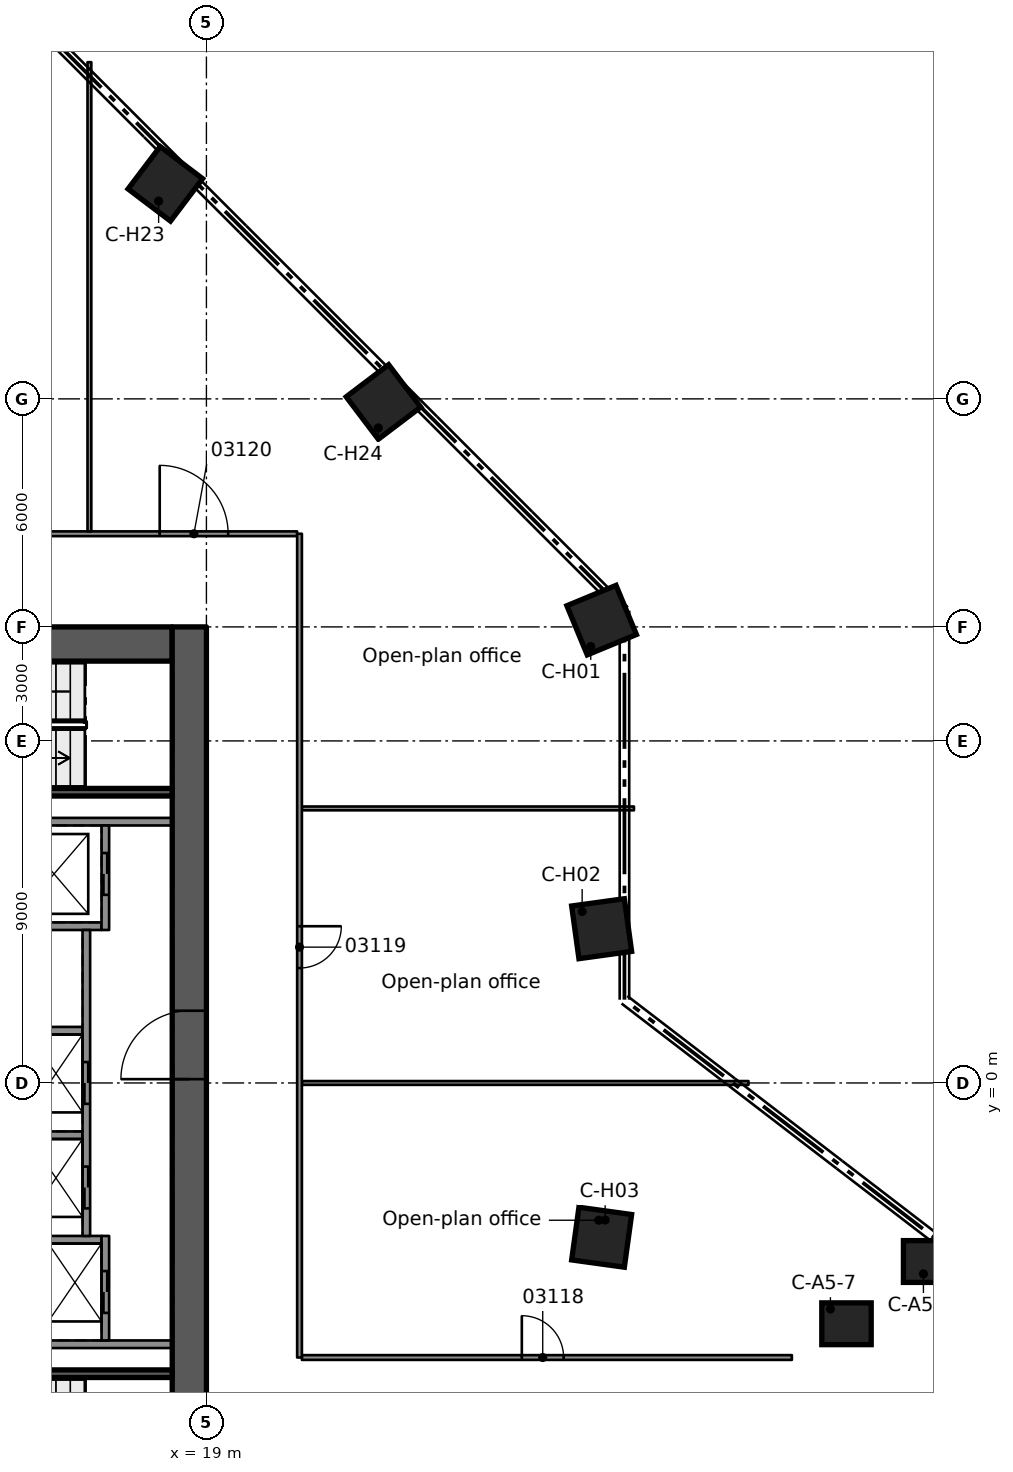
"""IFC4 building model, lengths in metres.
Left out: names, types, materials, properties, quantities, classifications, styles, units other than length and angle.
Written with IfcOpenShell. Run it as: python <this file> out.ifc"""

import sys

from ifc_helpers import new_model, si_unit, direction, frame, frame_2d, origin, origin_2d, place, context, subcontext, project, spatial, rectangle, extrude, element, fill, save


model = new_model("IFC4")
c1 = context("Model", 3, precision=1e-05, world=origin(), true_north=direction((0.0, 1.0)))
c2 = subcontext(c1, "Body", "Model", "MODEL_VIEW")
j1 = project(units=[si_unit("LENGTHUNIT", "METRE"), si_unit("PLANEANGLEUNIT", "RADIAN")], contexts=[c1])
p1 = place(None, origin())
s1 = spatial("IfcSite", under=j1, at=p1, CompositionType="ELEMENT")
p2 = place(p1, origin())
s2 = spatial("IfcBuilding", under=s1, at=p2, CompositionType="ELEMENT")
p3 = place(p2, frame((0.0, 0.0, 15.5)))
s3 = spatial("IfcBuildingStorey", under=s2, at=p3, CompositionType="ELEMENT", Elevation=15.5)
p4 = place(p3, frame((8.9, 11.55, 0.0), z_axis=(0.0, 0.0, 1.0), x_axis=(1.0, 0.0, 0.0)))
e1 = element("IfcWall", 1, at=p4, inside=s3, PredefinedType="SHEAR", context=c2, shape_type="SweptSolid", body=[
    extrude(rectangle(XDim=9.2, YDim=0.9, at=frame_2d((4.6, 0.0))), origin(), (0.0, 0.0, 1.0), 5.0),
])
p5 = place(p4, frame((3.0, 0.0, 0.0)))
e2 = element("IfcOpeningElement", 2, at=p5, cuts=e1, PredefinedType="OPENING", context=c2, shape_type="SweptSolid", body=[
    extrude(rectangle(XDim=1.1, YDim=2.1, at=frame_2d((0.55, 1.05))), frame((0.0, 0.46, 0.0), z_axis=(0.0, -1.0, 0.0), x_axis=(1.0, 0.0, 0.0)), (0.0, 0.0, 1.0), 0.92),
])
p6 = place(p4, frame((0.77, 0.0, 0.0)))
e3 = element("IfcOpeningElement", 3, at=p6, cuts=e1, PredefinedType="OPENING", context=c2, shape_type="SweptSolid", body=[
    extrude(rectangle(XDim=0.9, YDim=2.1, at=frame_2d((0.45, 1.05))), frame((0.0, 0.46, 0.0), z_axis=(0.0, -1.0, 0.0), x_axis=(1.0, 0.0, 0.0)), (0.0, 0.0, 1.0), 0.92),
])
p7 = place(p3, frame((18.55, -12.0, 0.0), z_axis=(0.0, 0.0, 1.0), x_axis=(0.0, 1.0, 0.0)))
e4 = element("IfcWall", 4, at=p7, inside=s3, PredefinedType="SHEAR", context=c2, shape_type="SweptSolid", body=[
    extrude(rectangle(XDim=24.0, YDim=0.9, at=frame_2d((12.0, 0.0))), origin(), (0.0, 0.0, 1.0), 5.0),
])
p8 = place(p7, frame((12.1, 0.0, 0.0)))
e5 = element("IfcOpeningElement", 5, at=p8, cuts=e4, PredefinedType="OPENING", context=c2, shape_type="SweptSolid", body=[
    extrude(rectangle(XDim=1.8, YDim=2.1, at=frame_2d((0.9, 1.05))), frame((0.0, 0.46, 0.0), z_axis=(0.0, -1.0, 0.0), x_axis=(1.0, 0.0, 0.0)), (0.0, 0.0, 1.0), 0.92),
])
for number, where, z_axis, x_axis in (
    (6, (37.991, -4.698, 0.0), (0.0, 0.0, 1.0), (1.0, 0.0, 0.0)),
    (7, (35.843, -6.336, 0.0), (0.0, 0.0, 1.0), (1.0, 0.0, 0.0)),
):
    element("IfcColumn", number, at=place(p3, frame(where, z_axis=z_axis, x_axis=x_axis)), inside=s3, PredefinedType="COLUMN", context=c2, shape_type="SweptSolid", body=[
        extrude(rectangle(XDim=1.3, YDim=1.1, at=origin_2d()), origin(), (0.0, 0.0, 1.0), 5.0),
    ])
for number, where, z_axis, x_axis in (
    (8, (29.4, 12.178, 0.0), (0.0, 0.0, 1.0), (0.924, 0.383, 0.0)),
    (9, (29.4, 4.059, 0.0), (0.0, 0.0, 1.0), (0.991, 0.137, 0.0)),
    (10, (29.4, -4.059, 0.0), (0.0, 0.0, 1.0), (0.991, -0.137, 0.0)),
    (11, (17.919, 23.659, 0.0), (0.0, 0.0, 1.0), (0.604, 0.797, 0.0)),
    (12, (23.659, 17.919, 0.0), (0.0, 0.0, 1.0), (0.797, 0.604, 0.0)),
):
    element("IfcColumn", number, at=place(p3, frame(where, z_axis=z_axis, x_axis=x_axis)), inside=s3, PredefinedType="COLUMN", context=c2, shape_type="SweptSolid", body=[
        extrude(rectangle(XDim=1.4, YDim=1.4, at=origin_2d()), origin(), (0.0, 0.0, 1.0), 5.0),
    ])
for number, where, z_axis, x_axis in (
    (13, (11.54, -6.875, 0.0), (0.0, 0.0, 1.0), (1.0, 0.0, 0.0)),
    (14, (11.54, 6.875, 0.0), (0.0, 0.0, 1.0), (1.0, 0.0, 0.0)),
):
    element("IfcWall", number, at=place(p3, frame(where, z_axis=z_axis, x_axis=x_axis)), inside=s3, PredefinedType="SOLIDWALL", context=c2, shape_type="SweptSolid", body=[
        extrude(rectangle(XDim=6.56, YDim=0.2, at=frame_2d((3.28, 0.0))), origin(), (0.0, 0.0, 1.0), 4.59),
    ])
p9 = place(p3, frame((11.54, 4.125, 0.0), z_axis=(0.0, 0.0, 1.0), x_axis=(1.0, 0.0, 0.0)))
e15 = element("IfcWall", 15, at=p9, inside=s3, PredefinedType="SOLIDWALL", context=c2, shape_type="SweptSolid", body=[
    extrude(rectangle(XDim=4.7, YDim=0.2, at=frame_2d((2.35, 0.0))), origin(), (0.0, 0.0, 1.0), 4.59),
])
for number, where, z_axis, x_axis in (
    (16, (11.54, 1.375, 0.0), (0.0, 0.0, 1.0), (1.0, 0.0, 0.0)),
    (17, (11.54, -1.375, 0.0), (0.0, 0.0, 1.0), (1.0, 0.0, 0.0)),
):
    element("IfcWall", number, at=place(p3, frame(where, z_axis=z_axis, x_axis=x_axis)), inside=s3, PredefinedType="SOLIDWALL", context=c2, shape_type="SweptSolid", body=[
        extrude(rectangle(XDim=4.2, YDim=0.2, at=frame_2d((2.1, 0.0))), origin(), (0.0, 0.0, 1.0), 4.59),
    ])
p10 = place(p3, frame((11.54, -4.125, 0.0), z_axis=(0.0, 0.0, 1.0), x_axis=(1.0, 0.0, 0.0)))
e18 = element("IfcWall", 18, at=p10, inside=s3, PredefinedType="SOLIDWALL", context=c2, shape_type="SweptSolid", body=[
    extrude(rectangle(XDim=4.7, YDim=0.2, at=frame_2d((2.35, 0.0))), origin(), (0.0, 0.0, 1.0), 4.59),
])
p11 = place(p3, frame((16.34, 6.775, 0.0), z_axis=(0.0, 0.0, 1.0), x_axis=(0.0, -1.0, 0.0)))
e19 = element("IfcWall", 19, at=p11, inside=s3, PredefinedType="SOLIDWALL", context=c2, shape_type="SweptSolid", body=[
    extrude(rectangle(XDim=2.75, YDim=0.2, at=frame_2d((1.375, 0.0))), origin(), (0.0, 0.0, 1.0), 4.59),
])
p12 = place(p11, frame((0.725, 0.0, 0.0)))
e20 = element("IfcOpeningElement", 20, at=p12, cuts=e19, PredefinedType="OPENING", context=c2, shape_type="SweptSolid", body=[
    extrude(rectangle(XDim=1.1, YDim=2.1, at=frame_2d((0.55, 1.05))), frame((0.0, 0.11, 0.0), z_axis=(0.0, -1.0, 0.0), x_axis=(1.0, 0.0, 0.0)), (0.0, 0.0, 1.0), 0.22),
])
p13 = place(p3, frame((15.84, 4.025, 0.0), z_axis=(0.0, 0.0, 1.0), x_axis=(0.0, -1.0, 0.0)))
e21 = element("IfcWall", 21, at=p13, inside=s3, PredefinedType="SOLIDWALL", context=c2, shape_type="SweptSolid", body=[
    extrude(rectangle(XDim=8.05, YDim=0.2, at=frame_2d((4.025, 0.0))), origin(), (0.0, 0.0, 1.0), 4.59),
])
p14 = place(p13, frame((3.475, 0.0, 0.0)))
e22 = element("IfcOpeningElement", 22, at=p14, cuts=e21, PredefinedType="OPENING", context=c2, shape_type="SweptSolid", body=[
    extrude(rectangle(XDim=1.1, YDim=2.1, at=frame_2d((0.55, 1.05))), frame((0.0, 0.11, 0.0), z_axis=(0.0, -1.0, 0.0), x_axis=(1.0, 0.0, 0.0)), (0.0, 0.0, 1.0), 0.22),
])
p15 = place(p13, frame((6.225, 0.0, 0.0)))
e23 = element("IfcOpeningElement", 23, at=p15, cuts=e21, PredefinedType="OPENING", context=c2, shape_type="SweptSolid", body=[
    extrude(rectangle(XDim=1.1, YDim=2.1, at=frame_2d((0.55, 1.05))), frame((0.0, 0.11, 0.0), z_axis=(0.0, -1.0, 0.0), x_axis=(1.0, 0.0, 0.0)), (0.0, 0.0, 1.0), 0.22),
])
p16 = place(p3, frame((16.34, -4.025, 0.0), z_axis=(0.0, 0.0, 1.0), x_axis=(0.0, -1.0, 0.0)))
e24 = element("IfcWall", 24, at=p16, inside=s3, PredefinedType="SOLIDWALL", context=c2, shape_type="SweptSolid", body=[
    extrude(rectangle(XDim=2.75, YDim=0.2, at=frame_2d((1.375, 0.0))), origin(), (0.0, 0.0, 1.0), 4.59),
])
p17 = place(p16, frame((0.925, 0.0, 0.0)))
e25 = element("IfcOpeningElement", 25, at=p17, cuts=e24, PredefinedType="OPENING", context=c2, shape_type="SweptSolid", body=[
    extrude(rectangle(XDim=1.1, YDim=2.1, at=frame_2d((0.55, 1.05))), frame((0.0, 0.11, 0.0), z_axis=(0.0, -1.0, 0.0), x_axis=(1.0, 0.0, 0.0)), (0.0, 0.0, 1.0), 0.22),
])
for number, where, z_axis, x_axis in (
    (26, (11.54, -7.65, 0.0), (0.0, 0.0, 1.0), (1.0, 0.0, 0.0)),
    (27, (11.54, 7.65, 0.0), (0.0, 0.0, 1.0), (1.0, 0.0, 0.0)),
):
    element("IfcWall", number, at=place(p3, frame(where, z_axis=z_axis, x_axis=x_axis)), inside=s3, PredefinedType="SOLIDWALL", context=c2, shape_type="SweptSolid", body=[
        extrude(rectangle(XDim=6.56, YDim=0.2, at=frame_2d((3.28, 0.0))), origin(), (0.0, 0.0, 1.0), 4.59),
    ])
p18 = place(p3, frame((21.512, -7.224, 0.0), z_axis=(0.0, 0.0, 1.0), x_axis=(1.0, 0.0, 0.0)))
e28 = element("IfcWall", 28, at=p18, inside=s3, PredefinedType="PARTITIONING", context=c2, shape_type="SweptSolid", body=[
    extrude(rectangle(XDim=12.894, YDim=0.125, at=frame_2d((6.447, 0.0))), origin(), (0.0, 0.0, 1.0), 4.58),
])
p19 = place(p18, frame((5.788, 0.0, 0.0)))
e29 = element("IfcOpeningElement", 29, at=p19, cuts=e28, PredefinedType="OPENING", context=c2, shape_type="SweptSolid", body=[
    extrude(rectangle(XDim=1.1, YDim=2.1, at=frame_2d((0.55, 1.05))), frame((0.0, 0.073, 0.0), z_axis=(0.0, -1.0, 0.0), x_axis=(1.0, 0.0, 0.0)), (0.0, 0.0, 1.0), 0.145),
])
p20 = place(p3, frame((21.512, 0.0, 0.0), z_axis=(0.0, 0.0, 1.0), x_axis=(1.0, 0.0, 0.0)))
e30 = element("IfcWall", 30, at=p20, inside=s3, PredefinedType="PARTITIONING", context=c2, shape_type="SweptSolid", body=[
    extrude(rectangle(XDim=11.752, YDim=0.1, at=frame_2d((5.876, 0.0))), origin(), (0.0, 0.0, 1.0), 4.58),
])
p21 = place(p3, frame((21.512, 7.224, 0.0), z_axis=(0.0, 0.0, 1.0), x_axis=(1.0, 0.0, 0.0)))
e31 = element("IfcWall", 31, at=p21, inside=s3, PredefinedType="PARTITIONING", context=c2, shape_type="SweptSolid", body=[
    extrude(rectangle(XDim=8.738, YDim=0.1, at=frame_2d((4.369, 0.0))), origin(), (0.0, 0.0, 1.0), 4.58),
])
p22 = place(p3, frame((10.391, 14.451, 0.0), z_axis=(0.0, 0.0, 1.0), x_axis=(1.0, 0.0, 0.0)))
e32 = element("IfcWall", 32, at=p22, inside=s3, PredefinedType="PARTITIONING", context=c2, shape_type="SweptSolid", body=[
    extrude(rectangle(XDim=10.996, YDim=0.125, at=frame_2d((5.498, 0.0))), origin(), (0.0, 0.0, 1.0), 4.58),
])
p23 = place(p22, frame((7.38, 0.0, 0.0)))
e33 = element("IfcOpeningElement", 33, at=p23, cuts=e32, PredefinedType="OPENING", context=c2, shape_type="SweptSolid", body=[
    extrude(rectangle(XDim=1.8, YDim=2.1, at=frame_2d((0.9, 1.05))), frame((0.0, 0.073, 0.0), z_axis=(0.0, -1.0, 0.0), x_axis=(1.0, 0.0, 0.0)), (0.0, 0.0, 1.0), 0.145),
])
p24 = place(p3, frame((21.45, 14.451, 0.0), z_axis=(0.0, 0.0, 1.0), x_axis=(0.0, -1.0, 0.0)))
e34 = element("IfcWall", 34, at=p24, inside=s3, PredefinedType="PARTITIONING", context=c2, shape_type="SweptSolid", body=[
    extrude(rectangle(XDim=21.675, YDim=0.125, at=frame_2d((10.837, 0.0))), origin(), (0.0, 0.0, 1.0), 4.58),
])
p25 = place(p24, frame((10.327, 0.0, 0.0)))
e35 = element("IfcOpeningElement", 35, at=p25, cuts=e34, PredefinedType="OPENING", context=c2, shape_type="SweptSolid", body=[
    extrude(rectangle(XDim=1.1, YDim=2.1, at=frame_2d((0.55, 1.05))), frame((0.0, 0.073, 0.0), z_axis=(0.0, -1.0, 0.0), x_axis=(1.0, 0.0, 0.0)), (0.0, 0.0, 1.0), 0.145),
])
p26 = place(p3, frame((15.921, 14.514, 0.0), z_axis=(0.0, 0.0, 1.0), x_axis=(0.0, 1.0, 0.0)))
e36 = element("IfcWall", 36, at=p26, inside=s3, PredefinedType="PARTITIONING", context=c2, shape_type="SweptSolid", body=[
    extrude(rectangle(XDim=12.345, YDim=0.1, at=frame_2d((6.172, 0.0))), origin(), (0.0, 0.0, 1.0), 4.58),
])
p27 = place(p12, origin())
e37 = element("IfcDoor", 37, at=p27, inside=s3, OperationType="DOUBLE_DOOR_SLIDING", PredefinedType="DOOR", context=c2, shape_type="SweptSolid", body=[
    extrude(rectangle(XDim=1.1, YDim=2.1, at=frame_2d((0.55, 1.05))), frame((0.0, 0.025, 0.0), z_axis=(0.0, -1.0, 0.0), x_axis=(1.0, 0.0, 0.0)), (0.0, 0.0, 1.0), 0.05),
])
fill(e20, e37)
p28 = place(p14, origin())
e38 = element("IfcDoor", 38, at=p28, inside=s3, OperationType="DOUBLE_DOOR_SLIDING", PredefinedType="DOOR", context=c2, shape_type="SweptSolid", body=[
    extrude(rectangle(XDim=1.1, YDim=2.1, at=frame_2d((0.55, 1.05))), frame((0.0, 0.025, 0.0), z_axis=(0.0, -1.0, 0.0), x_axis=(1.0, 0.0, 0.0)), (0.0, 0.0, 1.0), 0.05),
])
fill(e22, e38)
p29 = place(p15, origin())
e39 = element("IfcDoor", 39, at=p29, inside=s3, OperationType="DOUBLE_DOOR_SLIDING", PredefinedType="DOOR", context=c2, shape_type="SweptSolid", body=[
    extrude(rectangle(XDim=1.1, YDim=2.1, at=frame_2d((0.55, 1.05))), frame((0.0, 0.025, 0.0), z_axis=(0.0, -1.0, 0.0), x_axis=(1.0, 0.0, 0.0)), (0.0, 0.0, 1.0), 0.05),
])
fill(e23, e39)
p30 = place(p17, origin())
e40 = element("IfcDoor", 40, at=p30, inside=s3, OperationType="DOUBLE_DOOR_SLIDING", PredefinedType="DOOR", context=c2, shape_type="SweptSolid", body=[
    extrude(rectangle(XDim=1.1, YDim=2.1, at=frame_2d((0.55, 1.05))), frame((0.0, 0.025, 0.0), z_axis=(0.0, -1.0, 0.0), x_axis=(1.0, 0.0, 0.0)), (0.0, 0.0, 1.0), 0.05),
])
fill(e25, e40)
p31 = place(p8, origin())
e41 = element("IfcDoor", 41, at=p31, inside=s3, OperationType="SINGLE_SWING_RIGHT", PredefinedType="DOOR", context=c2, shape_type="SweptSolid", body=[
    extrude(rectangle(XDim=1.8, YDim=2.1, at=frame_2d((0.9, 1.05))), frame((0.0, 0.025, 0.0), z_axis=(0.0, -1.0, 0.0), x_axis=(1.0, 0.0, 0.0)), (0.0, 0.0, 1.0), 0.05),
])
fill(e5, e41)
p32 = place(p19, origin())
e42 = element("IfcDoor", 42, at=p32, inside=s3, OperationType="SINGLE_SWING_LEFT", PredefinedType="DOOR", context=c2, shape_type="SweptSolid", body=[
    extrude(rectangle(XDim=1.1, YDim=2.1, at=frame_2d((0.55, 1.05))), frame((0.0, 0.025, 0.0), z_axis=(0.0, -1.0, 0.0), x_axis=(1.0, 0.0, 0.0)), (0.0, 0.0, 1.0), 0.05),
])
fill(e29, e42)
p33 = place(p25, origin())
e43 = element("IfcDoor", 43, at=p33, inside=s3, OperationType="SINGLE_SWING_RIGHT", PredefinedType="DOOR", context=c2, shape_type="SweptSolid", body=[
    extrude(rectangle(XDim=1.1, YDim=2.1, at=frame_2d((0.55, 1.05))), frame((0.0, 0.025, 0.0), z_axis=(0.0, -1.0, 0.0), x_axis=(1.0, 0.0, 0.0)), (0.0, 0.0, 1.0), 0.05),
])
fill(e35, e43)
p34 = place(p23, origin())
e44 = element("IfcDoor", 44, at=p34, inside=s3, OperationType="DOUBLE_DOOR_SINGLE_SWING", PredefinedType="DOOR", context=c2, shape_type="SweptSolid", body=[
    extrude(rectangle(XDim=1.8, YDim=2.1, at=frame_2d((0.9, 1.05))), frame((0.0, 0.025, 0.0), z_axis=(0.0, -1.0, 0.0), x_axis=(1.0, 0.0, 0.0)), (0.0, 0.0, 1.0), 0.05),
])
fill(e33, e44)
save(model, sys.argv[1])
